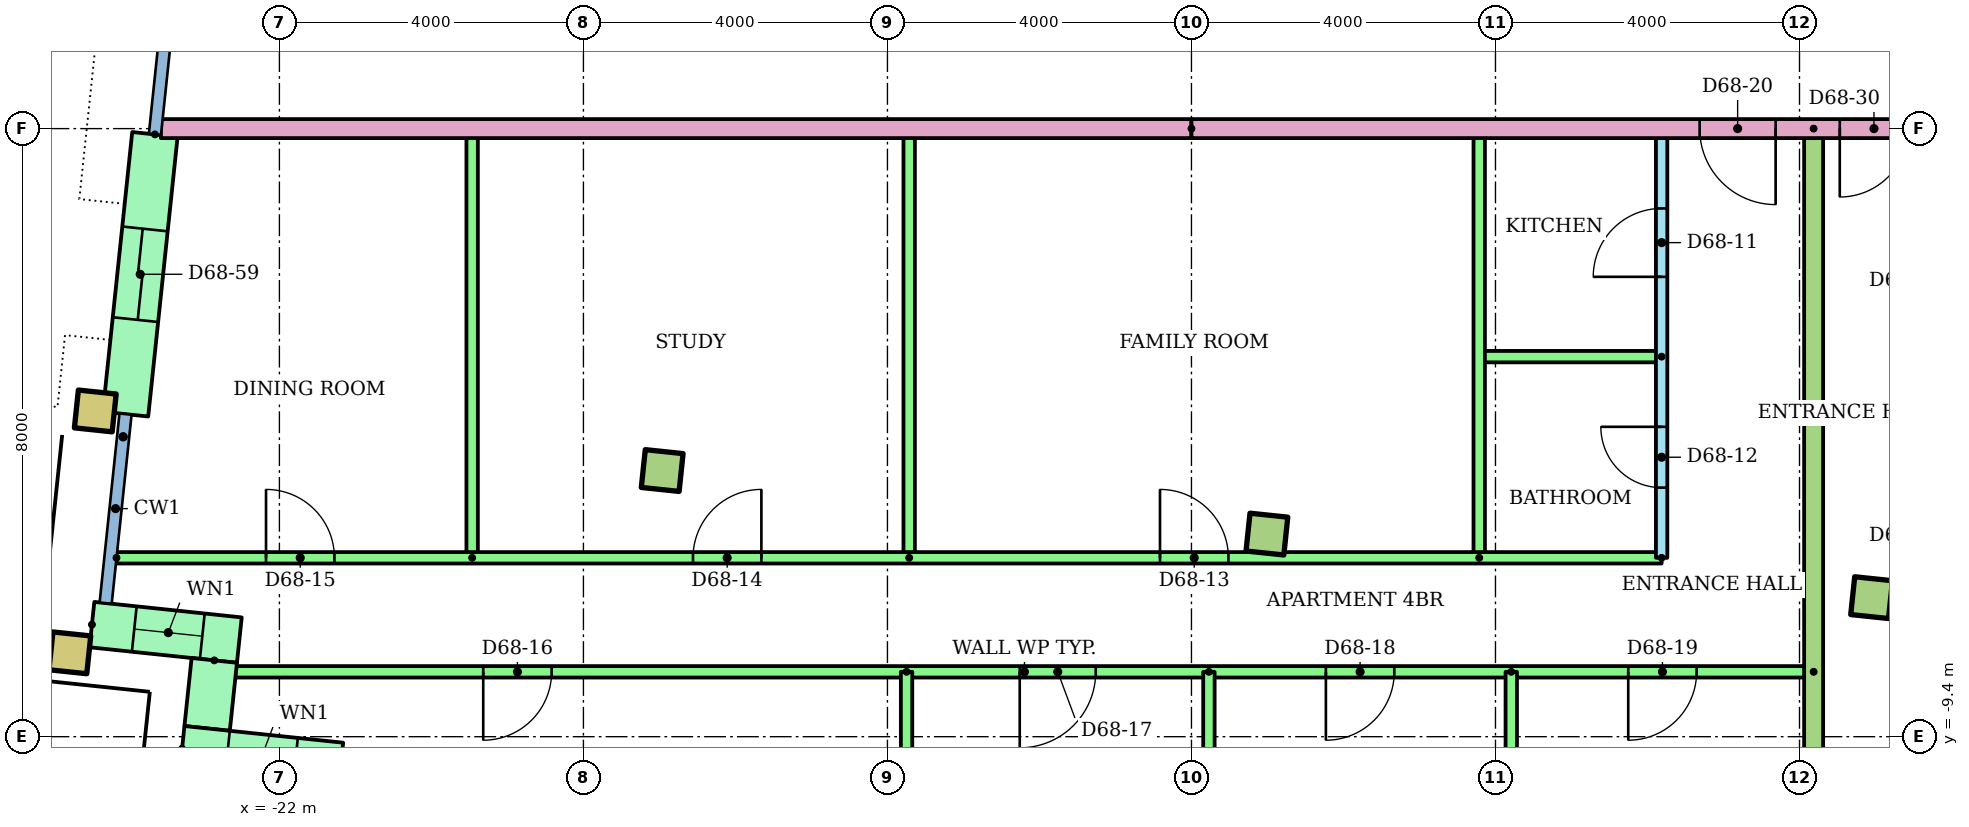
"""IFC4 building model, lengths in metres.
Left out: names, types, materials, properties, quantities, classifications, styles, units other than length and angle.
Written with IfcOpenShell. Run it as: python <this file> out.ifc"""

import sys

from ifc_helpers import new_model, si_unit, direction, frame, frame_2d, origin, origin_2d, place, context, subcontext, project, spatial, rectangle, hollow_rectangle, extrude, element, fill, save


model = new_model("IFC4")
c1 = context("Model", 3, precision=1e-05, world=origin(), true_north=direction((0.0, 1.0)))
c2 = subcontext(c1, "Body", "Model", "MODEL_VIEW")
j1 = project(units=[si_unit("LENGTHUNIT", "METRE"), si_unit("PLANEANGLEUNIT", "RADIAN")], contexts=[c1])
p1 = place(None, origin())
s1 = spatial("IfcSite", under=j1, at=p1, CompositionType="ELEMENT")
p2 = place(p1, origin())
s2 = spatial("IfcBuilding", under=s1, at=p2, CompositionType="ELEMENT")
p3 = place(p2, frame((0.0, 0.0, 262.7)))
s3 = spatial("IfcBuildingStorey", under=s2, at=p3, CompositionType="ELEMENT", Elevation=262.7)
for number, where, z_axis, x_axis in (
    (1, (-24.757, -8.297, 0.0), (0.0, 0.0, 1.0), (0.995, -0.105, 0.0)),
    (2, (-24.423, -5.115, 0.0), (0.0, 0.0, 1.0), (0.995, -0.105, 0.0)),
):
    element("IfcColumn", number, at=place(p3, frame(where, z_axis=z_axis, x_axis=x_axis)), inside=s3, PredefinedType="COLUMN", context=c2, shape_type="SweptSolid", body=[
        extrude(hollow_rectangle(XDim=0.5, YDim=0.5, WallThickness=0.025, at=origin_2d()), origin(), (0.0, 0.0, 1.0), 3.2),
    ])
for number, where, z_axis, x_axis in (
    (3, (-16.964, -5.898, 0.0), (0.0, 0.0, 1.0), (0.995, -0.105, 0.0)),
    (4, (-9.007, -6.735, 0.0), (0.0, 0.0, 1.0), (0.995, -0.105, 0.0)),
    (5, (-1.051, -7.571, 0.0), (0.0, 0.0, 1.0), (0.995, -0.105, 0.0)),
):
    element("IfcColumn", number, at=place(p3, frame(where, z_axis=z_axis, x_axis=x_axis)), inside=s3, PredefinedType="COLUMN", context=c2, shape_type="SweptSolid", body=[
        extrude(rectangle(XDim=0.5, YDim=0.5, at=origin_2d()), origin(), (0.0, 0.0, 1.0), 3.2),
    ])
p4 = place(p3, frame((-23.638, -1.476, 0.0), z_axis=(0.0, 0.0, 1.0), x_axis=(-0.104513052986, -0.994523514933, 0.0)))
e6 = element("IfcWall", 6, at=p4, inside=s3, PredefinedType="STANDARD", context=c2, shape_type="SweptSolid", body=[
    extrude(rectangle(XDim=3.7, YDim=0.6, at=frame_2d((1.85, 0.0))), origin(), (0.0, 0.0, 1.0), 2.92),
])
p5 = place(p4, frame((1.25, 0.0, 0.0)))
e7 = element("IfcOpeningElement", 7, at=p5, cuts=e6, PredefinedType="OPENING", context=c2, shape_type="SweptSolid", body=[
    extrude(rectangle(XDim=1.2, YDim=2.1, at=frame_2d((0.6, 1.05))), frame((0.0, 0.31, 0.0), z_axis=(0.0, -1.0, 0.0), x_axis=(1.0, 0.0, 0.0)), (0.0, 0.0, 1.0), 0.62),
])
p6 = place(p3, frame((-24.467, -7.925, 0.0), z_axis=(0.0, 0.0, 1.0), x_axis=(0.994521219184, -0.104534896528, 0.0)))
e8 = element("IfcWall", 8, at=p6, inside=s3, PredefinedType="STANDARD", context=c2, shape_type="SweptSolid", body=[
    extrude(rectangle(XDim=1.95, YDim=0.6, at=frame_2d((0.975, 0.0))), origin(), (0.0, 0.0, 1.0), 2.92),
])
p7 = place(p6, frame((0.56, 0.0, 0.9)))
e9 = element("IfcOpeningElement", 9, at=p7, cuts=e8, PredefinedType="OPENING", context=c2, shape_type="SweptSolid", body=[
    extrude(rectangle(XDim=0.9, YDim=1.5, at=frame_2d((0.45, 0.75))), frame((0.0, 0.31, 0.0), z_axis=(0.0, -1.0, 0.0), x_axis=(1.0, 0.0, 0.0)), (0.0, 0.0, 1.0), 0.62),
])
p8 = place(p3, frame((-22.857, -8.396, 0.0), z_axis=(0.0, 0.0, 1.0), x_axis=(-0.104444712852, -0.994530694326, 0.0)))
e10 = element("IfcWall", 10, at=p8, inside=s3, PredefinedType="STANDARD", context=c2, shape_type="SweptSolid", body=[
    extrude(rectangle(XDim=0.9, YDim=0.6, at=frame_2d((0.45, 0.0))), origin(), (0.0, 0.0, 1.0), 2.92),
])
p9 = place(p3, frame((-23.281, -9.558, 0.0), z_axis=(0.0, 0.0, 1.0), x_axis=(0.994523910136, -0.104509292252, 0.0)))
e11 = element("IfcWall", 11, at=p9, inside=s3, PredefinedType="STANDARD", context=c2, shape_type="SweptSolid", body=[
    extrude(rectangle(XDim=2.1, YDim=0.6, at=frame_2d((1.05, 0.0))), origin(), (0.0, 0.0, 1.0), 2.92),
])
p10 = place(p9, frame((0.6, 0.0, 0.9)))
e12 = element("IfcOpeningElement", 12, at=p10, cuts=e11, PredefinedType="OPENING", context=c2, shape_type="SweptSolid", body=[
    extrude(rectangle(XDim=0.9, YDim=1.5, at=frame_2d((0.45, 0.75))), frame((0.0, 0.31, 0.0), z_axis=(0.0, -1.0, 0.0), x_axis=(1.0, 0.0, 0.0)), (0.0, 0.0, 1.0), 0.62),
])
p11 = place(p3, frame((-3.814, -7.047, 0.0), z_axis=(0.0, 0.0, 1.0), x_axis=(0.0, 1.0, 0.0)))
e13 = element("IfcWall", 13, at=p11, inside=s3, PredefinedType="PARTITIONING", context=c2, shape_type="SweptSolid", body=[
    extrude(rectangle(XDim=5.647, YDim=0.15, at=frame_2d((2.823, 0.0))), origin(), (0.0, 0.0, 1.0), 2.4),
])
p12 = place(p11, frame((3.697, 0.0, 0.0)))
e14 = element("IfcOpeningElement", 14, at=p12, cuts=e13, PredefinedType="OPENING", context=c2, shape_type="SweptSolid", body=[
    extrude(rectangle(XDim=0.9, YDim=2.1, at=frame_2d((0.45, 1.05))), frame((0.0, 0.085, 0.0), z_axis=(0.0, -1.0, 0.0), x_axis=(1.0, 0.0, 0.0)), (0.0, 0.0, 1.0), 0.17),
])
p13 = place(p11, frame((0.923, 0.0, 0.0)))
e15 = element("IfcOpeningElement", 15, at=p13, cuts=e13, PredefinedType="OPENING", context=c2, shape_type="SweptSolid", body=[
    extrude(rectangle(XDim=0.8, YDim=2.1, at=frame_2d((0.4, 1.05))), frame((0.0, 0.085, 0.0), z_axis=(0.0, -1.0, 0.0), x_axis=(1.0, 0.0, 0.0)), (0.0, 0.0, 1.0), 0.17),
])
p14 = place(p3, frame((-3.814, -4.4, 0.0), z_axis=(0.0, 0.0, 1.0), x_axis=(-1.0, 0.0, 0.0)))
e16 = element("IfcWall", 16, at=p14, inside=s3, PredefinedType="PARTITIONING", context=c2, shape_type="SweptSolid", body=[
    extrude(rectangle(XDim=2.4, YDim=0.15, at=frame_2d((1.2, 0.0))), origin(), (0.0, 0.0, 1.0), 2.4),
])
for number, where, z_axis, x_axis in (
    (17, (-6.214, -7.047, 0.0), (0.0, 0.0, 1.0), (0.0, 1.0, 0.0)),
    (18, (-13.714, -7.047, 0.0), (0.0, 0.0, 1.0), (0.0, 1.0, 0.0)),
    (19, (-19.464, -7.047, 0.0), (0.0, 0.0, 1.0), (0.0, 1.0, 0.0)),
):
    element("IfcWall", number, at=place(p3, frame(where, z_axis=z_axis, x_axis=x_axis)), inside=s3, PredefinedType="PARTITIONING", context=c2, shape_type="SweptSolid", body=[
        extrude(rectangle(XDim=5.647, YDim=0.15, at=frame_2d((2.823, 0.0))), origin(), (0.0, 0.0, 1.0), 2.4),
    ])
p15 = place(p3, frame((-24.144, -7.047, 0.0)))
e20 = element("IfcWall", 20, at=p15, inside=s3, PredefinedType="PARTITIONING", context=c2, shape_type="SweptSolid", body=[
    extrude(rectangle(XDim=20.33, YDim=0.15, at=frame_2d((10.165, 0.0))), origin(), (0.0, 0.0, 1.0), 2.4),
])
p16 = place(p15, frame((13.73, 0.0, 0.0)))
e21 = element("IfcOpeningElement", 21, at=p16, cuts=e20, PredefinedType="OPENING", context=c2, shape_type="SweptSolid", body=[
    extrude(rectangle(XDim=0.9, YDim=2.1, at=frame_2d((0.45, 1.05))), frame((0.0, 0.085, 0.0), z_axis=(0.0, -1.0, 0.0), x_axis=(1.0, 0.0, 0.0)), (0.0, 0.0, 1.0), 0.17),
])
p17 = place(p15, frame((7.585, 0.0, 0.0)))
e22 = element("IfcOpeningElement", 22, at=p17, cuts=e20, PredefinedType="OPENING", context=c2, shape_type="SweptSolid", body=[
    extrude(rectangle(XDim=0.9, YDim=2.1, at=frame_2d((0.45, 1.05))), frame((0.0, 0.085, 0.0), z_axis=(0.0, -1.0, 0.0), x_axis=(1.0, 0.0, 0.0)), (0.0, 0.0, 1.0), 0.17),
])
p18 = place(p15, frame((1.968, 0.0, 0.0)))
e23 = element("IfcOpeningElement", 23, at=p18, cuts=e20, PredefinedType="OPENING", context=c2, shape_type="SweptSolid", body=[
    extrude(rectangle(XDim=0.9, YDim=2.1, at=frame_2d((0.45, 1.05))), frame((0.0, 0.085, 0.0), z_axis=(0.0, -1.0, 0.0), x_axis=(1.0, 0.0, 0.0)), (0.0, 0.0, 1.0), 0.17),
])
p19 = place(p3, frame((-1.814, -8.547, 0.0), z_axis=(0.0, 0.0, 1.0), x_axis=(-1.0, 0.0, 0.0)))
e24 = element("IfcWall", 24, at=p19, inside=s3, PredefinedType="PARTITIONING", context=c2, shape_type="SweptSolid", body=[
    extrude(rectangle(XDim=20.767, YDim=0.15, at=frame_2d((10.384, 0.0))), origin(), (0.0, 0.0, 1.0), 2.4),
])
p20 = place(p19, frame((16.604, 0.0, 0.0)))
e25 = element("IfcOpeningElement", 25, at=p20, cuts=e24, PredefinedType="OPENING", context=c2, shape_type="SweptSolid", body=[
    extrude(rectangle(XDim=0.9, YDim=2.1, at=frame_2d((0.45, 1.05))), frame((0.0, 0.085, 0.0), z_axis=(0.0, -1.0, 0.0), x_axis=(1.0, 0.0, 0.0)), (0.0, 0.0, 1.0), 0.17),
])
p21 = place(p19, frame((9.446, 0.0, 0.0)))
e26 = element("IfcOpeningElement", 26, at=p21, cuts=e24, PredefinedType="OPENING", context=c2, shape_type="SweptSolid", body=[
    extrude(rectangle(XDim=1.0, YDim=2.1, at=frame_2d((0.5, 1.05))), frame((0.0, 0.085, 0.0), z_axis=(0.0, -1.0, 0.0), x_axis=(1.0, 0.0, 0.0)), (0.0, 0.0, 1.0), 0.17),
])
p22 = place(p19, frame((5.517, 0.0, 0.0)))
e27 = element("IfcOpeningElement", 27, at=p22, cuts=e24, PredefinedType="OPENING", context=c2, shape_type="SweptSolid", body=[
    extrude(rectangle(XDim=0.9, YDim=2.1, at=frame_2d((0.45, 1.05))), frame((0.0, 0.085, 0.0), z_axis=(0.0, -1.0, 0.0), x_axis=(1.0, 0.0, 0.0)), (0.0, 0.0, 1.0), 0.17),
])
p23 = place(p19, frame((1.539, 0.0, 0.0)))
e28 = element("IfcOpeningElement", 28, at=p23, cuts=e24, PredefinedType="OPENING", context=c2, shape_type="SweptSolid", body=[
    extrude(rectangle(XDim=0.9, YDim=2.1, at=frame_2d((0.45, 1.05))), frame((0.0, 0.085, 0.0), z_axis=(0.0, -1.0, 0.0), x_axis=(1.0, 0.0, 0.0)), (0.0, 0.0, 1.0), 0.17),
])
p24 = place(p3, frame((-13.749, -8.547, 0.0), z_axis=(0.0, 0.0, 1.0), x_axis=(0.0, -1.0, 0.0)))
e29 = element("IfcWall", 29, at=p24, inside=s3, PredefinedType="PARTITIONING", context=c2, shape_type="SweptSolid", body=[
    extrude(rectangle(XDim=4.95, YDim=0.15, at=frame_2d((2.475, 0.0))), origin(), (0.0, 0.0, 1.0), 2.4),
])
p25 = place(p3, frame((-9.771, -8.547, 0.0), z_axis=(0.0, 0.0, 1.0), x_axis=(0.0, -1.0, 0.0)))
e30 = element("IfcWall", 30, at=p25, inside=s3, PredefinedType="PARTITIONING", context=c2, shape_type="SweptSolid", body=[
    extrude(rectangle(XDim=5.358, YDim=0.15, at=frame_2d((2.679, 0.0))), origin(), (0.0, 0.0, 1.0), 2.4),
])
p26 = place(p3, frame((-5.792, -8.547, 0.0), z_axis=(0.0, 0.0, 1.0), x_axis=(0.0, -1.0, 0.0)))
e31 = element("IfcWall", 31, at=p26, inside=s3, PredefinedType="PARTITIONING", context=c2, shape_type="SweptSolid", body=[
    extrude(rectangle(XDim=5.787, YDim=0.15, at=frame_2d((2.893, 0.0))), origin(), (0.0, 0.0, 1.0), 2.4),
])
p27 = place(p3, frame((-1.814, -1.4, 0.0), z_axis=(0.0, 0.0, 1.0), x_axis=(0.0, -1.0, 0.0)))
e32 = element("IfcWall", 32, at=p27, inside=s3, PredefinedType="PARTITIONING", context=c2, shape_type="SweptSolid", body=[
    extrude(rectangle(XDim=13.341, YDim=0.25, at=frame_2d((6.67, 0.0))), origin(), (0.0, 0.0, 1.0), 2.4),
])
p28 = place(p3, frame((-10.0, -1.4, 0.0), z_axis=(0.0, 0.0, 1.0), x_axis=(-1.0, 0.0, 0.0)))
e33 = element("IfcWall", 33, at=p28, inside=s3, PredefinedType="PARTITIONING", context=c2, shape_type="SweptSolid", body=[
    extrude(rectangle(XDim=13.56, YDim=0.25, at=frame_2d((6.78, 0.0))), origin(), (0.0, 0.0, 1.0), 2.4),
])
p29 = place(p3, frame((10.0, -1.4, 0.0), z_axis=(0.0, 0.0, 1.0), x_axis=(-1.0, 0.0, 0.0)))
e34 = element("IfcWall", 34, at=p29, inside=s3, PredefinedType="PARTITIONING", context=c2, shape_type="SweptSolid", body=[
    extrude(rectangle(XDim=20.0, YDim=0.25, at=frame_2d((10.0, 0.0))), origin(), (0.0, 0.0, 1.0), 2.4),
])
p30 = place(p29, frame((12.314, 0.0, 0.0)))
e35 = element("IfcOpeningElement", 35, at=p30, cuts=e34, PredefinedType="OPENING", context=c2, shape_type="SweptSolid", body=[
    extrude(rectangle(XDim=1.0, YDim=2.1, at=frame_2d((0.5, 1.05))), frame((0.0, 0.135, 0.0), z_axis=(0.0, -1.0, 0.0), x_axis=(1.0, 0.0, 0.0)), (0.0, 0.0, 1.0), 0.27),
])
p31 = place(p29, frame((10.57, 0.0, 0.0)))
e36 = element("IfcOpeningElement", 36, at=p31, cuts=e34, PredefinedType="OPENING", context=c2, shape_type="SweptSolid", body=[
    extrude(rectangle(XDim=0.9, YDim=2.1, at=frame_2d((0.45, 1.05))), frame((0.0, 0.135, 0.0), z_axis=(0.0, -1.0, 0.0), x_axis=(1.0, 0.0, 0.0)), (0.0, 0.0, 1.0), 0.27),
])
p32 = place(p7, origin())
e37 = element("IfcWindow", 37, at=p32, inside=s3, PartitioningType="SINGLE_PANEL", PredefinedType="WINDOW", context=c2, shape_type="SweptSolid", body=[
    extrude(rectangle(XDim=0.9, YDim=1.5, at=frame_2d((0.45, 0.75))), frame((0.0, 0.03, 0.0), z_axis=(0.0, -1.0, 0.0), x_axis=(1.0, 0.0, 0.0)), (0.0, 0.0, 1.0), 0.06),
])
fill(e9, e37)
p33 = place(p12, origin())
e38 = element("IfcDoor", 38, at=p33, inside=s3, OperationType="SINGLE_SWING_LEFT", PredefinedType="DOOR", context=c2, shape_type="SweptSolid", body=[
    extrude(rectangle(XDim=0.9, YDim=2.1, at=frame_2d((0.45, 1.05))), frame((0.0, 0.025, 0.0), z_axis=(0.0, -1.0, 0.0), x_axis=(1.0, 0.0, 0.0)), (0.0, 0.0, 1.0), 0.05),
])
fill(e14, e38)
p34 = place(p13, origin())
e39 = element("IfcDoor", 39, at=p34, inside=s3, OperationType="SINGLE_SWING_RIGHT", PredefinedType="DOOR", context=c2, shape_type="SweptSolid", body=[
    extrude(rectangle(XDim=0.8, YDim=2.1, at=frame_2d((0.4, 1.05))), frame((0.0, 0.025, 0.0), z_axis=(0.0, -1.0, 0.0), x_axis=(1.0, 0.0, 0.0)), (0.0, 0.0, 1.0), 0.05),
])
fill(e15, e39)
p35 = place(p16, origin())
e40 = element("IfcDoor", 40, at=p35, inside=s3, OperationType="SINGLE_SWING_LEFT", PredefinedType="DOOR", context=c2, shape_type="SweptSolid", body=[
    extrude(rectangle(XDim=0.9, YDim=2.1, at=frame_2d((0.45, 1.05))), frame((0.0, 0.025, 0.0), z_axis=(0.0, -1.0, 0.0), x_axis=(1.0, 0.0, 0.0)), (0.0, 0.0, 1.0), 0.05),
])
fill(e21, e40)
p36 = place(p17, origin())
e41 = element("IfcDoor", 41, at=p36, inside=s3, OperationType="SINGLE_SWING_RIGHT", PredefinedType="DOOR", context=c2, shape_type="SweptSolid", body=[
    extrude(rectangle(XDim=0.9, YDim=2.1, at=frame_2d((0.45, 1.05))), frame((0.0, 0.025, 0.0), z_axis=(0.0, -1.0, 0.0), x_axis=(1.0, 0.0, 0.0)), (0.0, 0.0, 1.0), 0.05),
])
fill(e22, e41)
p37 = place(p18, origin())
e42 = element("IfcDoor", 42, at=p37, inside=s3, OperationType="SINGLE_SWING_LEFT", PredefinedType="DOOR", context=c2, shape_type="SweptSolid", body=[
    extrude(rectangle(XDim=0.9, YDim=2.1, at=frame_2d((0.45, 1.05))), frame((0.0, 0.025, 0.0), z_axis=(0.0, -1.0, 0.0), x_axis=(1.0, 0.0, 0.0)), (0.0, 0.0, 1.0), 0.05),
])
fill(e23, e42)
p38 = place(p20, origin())
e43 = element("IfcDoor", 43, at=p38, inside=s3, OperationType="SINGLE_SWING_RIGHT", PredefinedType="DOOR", context=c2, shape_type="SweptSolid", body=[
    extrude(rectangle(XDim=0.9, YDim=2.1, at=frame_2d((0.45, 1.05))), frame((0.0, 0.025, 0.0), z_axis=(0.0, -1.0, 0.0), x_axis=(1.0, 0.0, 0.0)), (0.0, 0.0, 1.0), 0.05),
])
fill(e25, e43)
p39 = place(p21, origin())
e44 = element("IfcDoor", 44, at=p39, inside=s3, OperationType="SINGLE_SWING_RIGHT", PredefinedType="DOOR", context=c2, shape_type="SweptSolid", body=[
    extrude(rectangle(XDim=1.0, YDim=2.1, at=frame_2d((0.5, 1.05))), frame((0.0, 0.025, 0.0), z_axis=(0.0, -1.0, 0.0), x_axis=(1.0, 0.0, 0.0)), (0.0, 0.0, 1.0), 0.05),
])
fill(e26, e44)
p40 = place(p22, origin())
e45 = element("IfcDoor", 45, at=p40, inside=s3, OperationType="SINGLE_SWING_RIGHT", PredefinedType="DOOR", context=c2, shape_type="SweptSolid", body=[
    extrude(rectangle(XDim=0.9, YDim=2.1, at=frame_2d((0.45, 1.05))), frame((0.0, 0.025, 0.0), z_axis=(0.0, -1.0, 0.0), x_axis=(1.0, 0.0, 0.0)), (0.0, 0.0, 1.0), 0.05),
])
fill(e27, e45)
p41 = place(p23, origin())
e46 = element("IfcDoor", 46, at=p41, inside=s3, OperationType="SINGLE_SWING_RIGHT", PredefinedType="DOOR", context=c2, shape_type="SweptSolid", body=[
    extrude(rectangle(XDim=0.9, YDim=2.1, at=frame_2d((0.45, 1.05))), frame((0.0, 0.025, 0.0), z_axis=(0.0, -1.0, 0.0), x_axis=(1.0, 0.0, 0.0)), (0.0, 0.0, 1.0), 0.05),
])
fill(e28, e46)
p42 = place(p30, origin())
e47 = element("IfcDoor", 47, at=p42, inside=s3, OperationType="SINGLE_SWING_LEFT", PredefinedType="DOOR", context=c2, shape_type="SweptSolid", body=[
    extrude(rectangle(XDim=1.0, YDim=2.1, at=frame_2d((0.5, 1.05))), frame((0.0, 0.025, 0.0), z_axis=(0.0, -1.0, 0.0), x_axis=(1.0, 0.0, 0.0)), (0.0, 0.0, 1.0), 0.05),
])
fill(e35, e47)
p43 = place(p31, origin())
e48 = element("IfcDoor", 48, at=p43, inside=s3, OperationType="SINGLE_SWING_RIGHT", PredefinedType="DOOR", context=c2, shape_type="SweptSolid", body=[
    extrude(rectangle(XDim=0.9, YDim=2.1, at=frame_2d((0.45, 1.05))), frame((0.0, 0.025, 0.0), z_axis=(0.0, -1.0, 0.0), x_axis=(1.0, 0.0, 0.0)), (0.0, 0.0, 1.0), 0.05),
])
fill(e36, e48)
p44 = place(p5, origin())
e49 = element("IfcDoor", 49, at=p44, inside=s3, OperationType="SLIDING_TO_LEFT", PredefinedType="DOOR", context=c2, shape_type="SweptSolid", body=[
    extrude(rectangle(XDim=1.2, YDim=2.1, at=frame_2d((0.6, 1.05))), frame((0.0, 0.025, 0.0), z_axis=(0.0, -1.0, 0.0), x_axis=(1.0, 0.0, 0.0)), (0.0, 0.0, 1.0), 0.05),
])
fill(e7, e49)
save(model, sys.argv[1])
